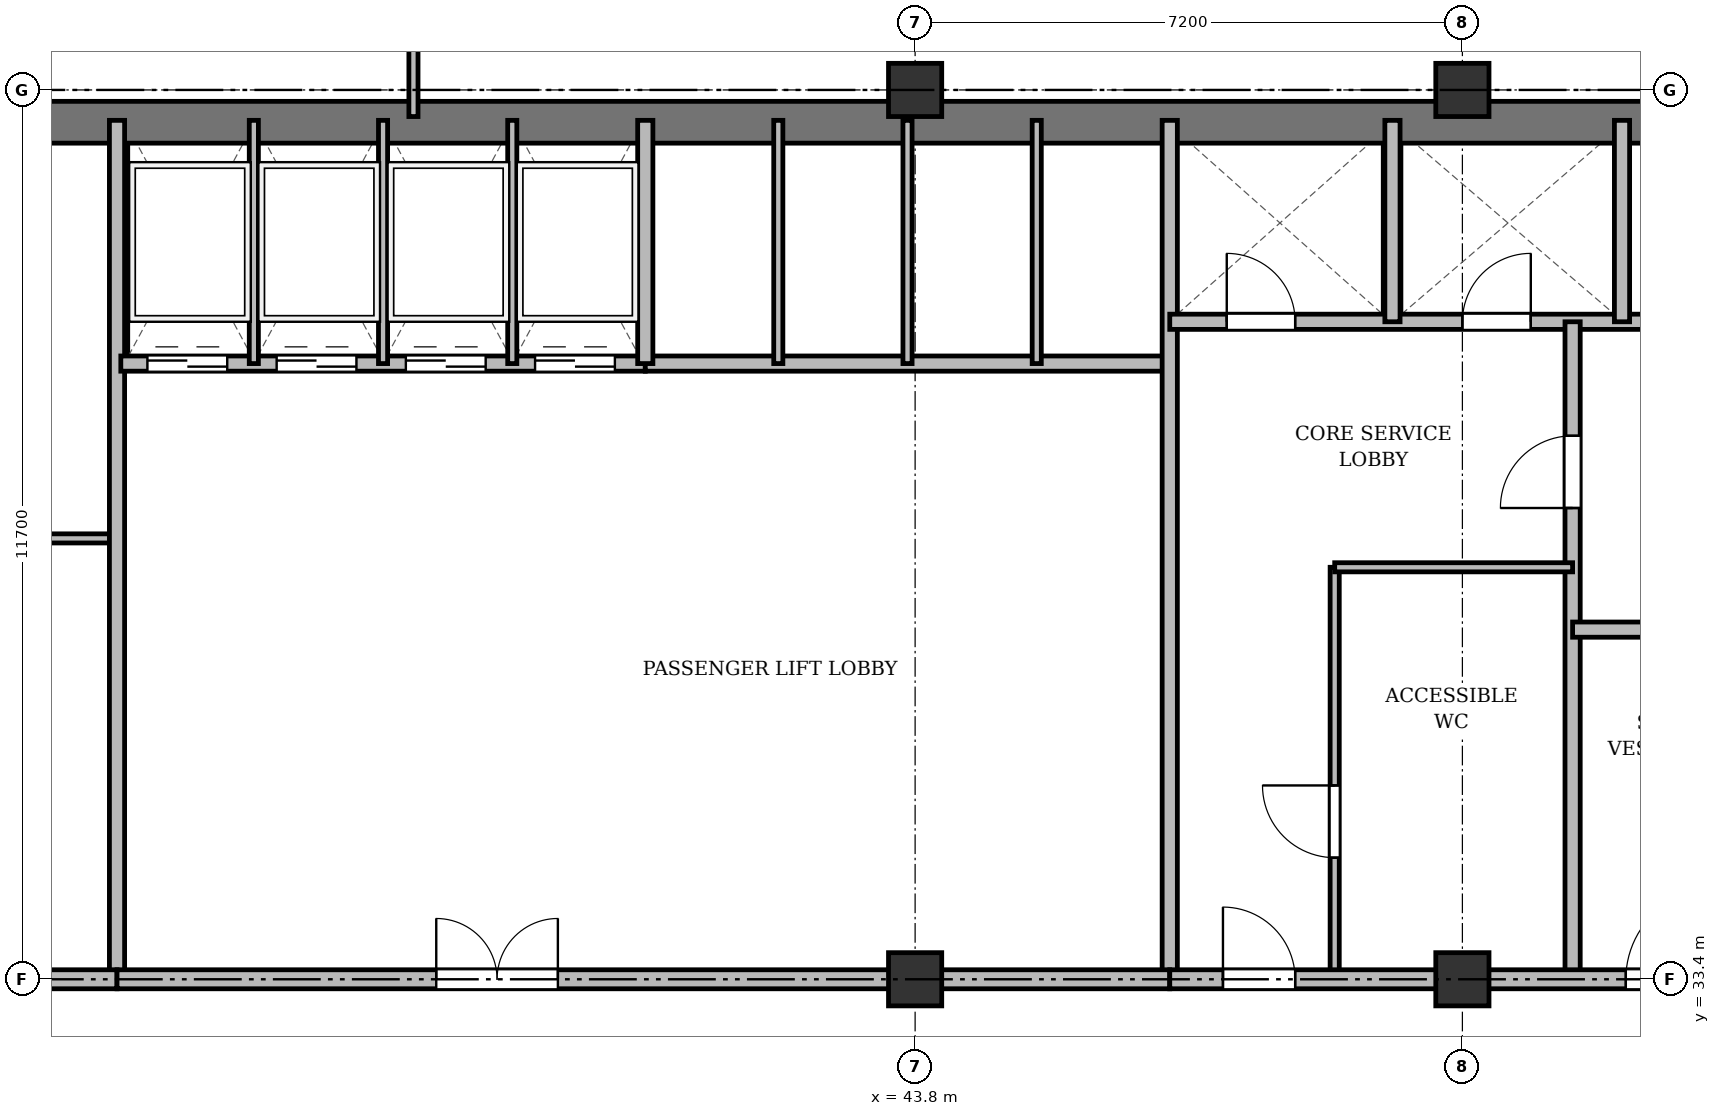
"""IFC4 building model, lengths in metres.
Left out: names, types, materials, properties, quantities, classifications, styles, units other than length and angle.
Written with IfcOpenShell. Run it as: python <this file> out.ifc"""

import sys

from ifc_helpers import new_model, si_unit, direction, frame, frame_2d, origin, origin_2d, place, context, subcontext, project, spatial, rectangle, extrude, source, transform, mapped, element, fill, save


model = new_model("IFC4")
c1 = context("Model", 3, precision=1e-05, world=origin(), true_north=direction((0.0, 1.0)))
c2 = subcontext(c1, "Body", "Model", "MODEL_VIEW")
j1 = project(units=[si_unit("LENGTHUNIT", "METRE"), si_unit("PLANEANGLEUNIT", "RADIAN")], contexts=[c1])
p1 = place(None, origin())
s1 = spatial("IfcSite", under=j1, at=p1, CompositionType="ELEMENT")
p2 = place(p1, origin())
s2 = spatial("IfcBuilding", under=s1, at=p2, CompositionType="ELEMENT")
p3 = place(p2, frame((0.0, 0.0, 175.3)))
s3 = spatial("IfcBuildingStorey", under=s2, at=p3, CompositionType="ELEMENT", Elevation=175.3)
m1 = source(origin(), c2, "Body", "SweptSolid", [
    extrude(rectangle(XDim=0.7, YDim=0.7, at=origin_2d()), origin(), (0.0, 0.0, 1.0), 3.6),
])
for number, where, z_axis, x_axis in (
    (1, (43.8, 33.4, 0.0), (0.0, 0.0, 1.0), (1.0, 0.0, 0.0)),
    (2, (43.8, 45.1, 0.0), (0.0, 0.0, 1.0), (1.0, 0.0, 0.0)),
    (3, (51.0, 33.4, 0.0), (0.0, 0.0, 1.0), (1.0, 0.0, 0.0)),
    (4, (51.0, 45.1, 0.0), (0.0, 0.0, 1.0), (1.0, 0.0, 0.0)),
):
    element("IfcColumn", number, at=place(p3, frame(where, z_axis=z_axis, x_axis=x_axis)), inside=s3, PredefinedType="COLUMN", context=c2, shape_type="MappedRepresentation", body=[
        mapped(m1, transform((0.0, 0.0, 0.0), x_axis=(1.0, 0.0, 0.0), y_axis=(0.0, 1.0, 0.0), z_axis=(0.0, 0.0, 1.0), scale=1.0)),
    ])
p4 = place(p3, frame((15.65, 44.675, 0.0), z_axis=(0.0, 0.0, 1.0), x_axis=(1.0, 0.0, 0.0)))
e5 = element("IfcWall", 5, at=p4, inside=s3, PredefinedType="SHEAR", context=c2, shape_type="SweptSolid", body=[
    extrude(rectangle(XDim=43.1, YDim=0.55, at=frame_2d((21.55, 0.0))), origin(), (0.0, 0.0, 1.0), 3.35),
])
p5 = place(p3, frame((26.3, 39.2, 0.0), z_axis=(0.0, 0.0, 1.0), x_axis=(1.0, 0.0, 0.0)))
e6 = element("IfcWall", 6, at=p5, inside=s3, PredefinedType="PARTITIONING", context=c2, shape_type="SweptSolid", body=[
    extrude(rectangle(XDim=7.0, YDim=0.12, at=frame_2d((3.5, 0.0))), origin(), (0.0, 0.0, 1.0), 2.85),
])
p6 = place(p5, frame((2.6, 0.0, 0.0)))
e7 = element("IfcOpeningElement", 7, at=p6, cuts=e6, PredefinedType="OPENING", context=c2, shape_type="SweptSolid", body=[
    extrude(rectangle(XDim=0.95, YDim=2.15, at=frame_2d((0.475, 1.075))), frame((0.0, 0.07, 0.0), z_axis=(0.0, -1.0, 0.0), x_axis=(1.0, 0.0, 0.0)), (0.0, 0.0, 1.0), 0.14),
])
p7 = place(p3, frame((33.3, 33.4, 0.0), z_axis=(0.0, 0.0, 1.0), x_axis=(0.0, 1.0, 0.0)))
e8 = element("IfcWall", 8, at=p7, inside=s3, PredefinedType="SOLIDWALL", context=c2, shape_type="SweptSolid", body=[
    extrude(rectangle(XDim=11.3, YDim=0.2, at=frame_2d((5.65, 0.0))), origin(), (0.0, 0.0, 1.0), 2.75),
])
p8 = place(p3, frame((33.35, 41.5, 0.0), z_axis=(0.0, 0.0, 1.0), x_axis=(1.0, 0.0, 0.0)))
e9 = element("IfcWall", 9, at=p8, inside=s3, PredefinedType="SOLIDWALL", context=c2, shape_type="SweptSolid", body=[
    extrude(rectangle(XDim=6.9, YDim=0.2, at=frame_2d((3.45, 0.0))), origin(), (0.0, 0.0, 1.0), 3.35),
])
p9 = place(p8, frame((0.35, 0.0, 0.0)))
e10 = element("IfcOpeningElement", 10, at=p9, cuts=e9, PredefinedType="OPENING", context=c2, shape_type="SweptSolid", body=[
    extrude(rectangle(XDim=1.05, YDim=2.15, at=frame_2d((0.525, 1.075))), frame((0.0, 0.11, 0.0), z_axis=(0.0, -1.0, 0.0), x_axis=(1.0, 0.0, 0.0)), (0.0, 0.0, 1.0), 0.22),
])
p10 = place(p8, frame((2.05, 0.0, 0.0)))
e11 = element("IfcOpeningElement", 11, at=p10, cuts=e9, PredefinedType="OPENING", context=c2, shape_type="SweptSolid", body=[
    extrude(rectangle(XDim=1.05, YDim=2.15, at=frame_2d((0.525, 1.075))), frame((0.0, 0.11, 0.0), z_axis=(0.0, -1.0, 0.0), x_axis=(1.0, 0.0, 0.0)), (0.0, 0.0, 1.0), 0.22),
])
p11 = place(p8, frame((3.75, 0.0, 0.0)))
e12 = element("IfcOpeningElement", 12, at=p11, cuts=e9, PredefinedType="OPENING", context=c2, shape_type="SweptSolid", body=[
    extrude(rectangle(XDim=1.05, YDim=2.15, at=frame_2d((0.525, 1.075))), frame((0.0, 0.11, 0.0), z_axis=(0.0, -1.0, 0.0), x_axis=(1.0, 0.0, 0.0)), (0.0, 0.0, 1.0), 0.22),
])
p12 = place(p8, frame((5.45, 0.0, 0.0)))
e13 = element("IfcOpeningElement", 13, at=p12, cuts=e9, PredefinedType="OPENING", context=c2, shape_type="SweptSolid", body=[
    extrude(rectangle(XDim=1.05, YDim=2.15, at=frame_2d((0.525, 1.075))), frame((0.0, 0.11, 0.0), z_axis=(0.0, -1.0, 0.0), x_axis=(1.0, 0.0, 0.0)), (0.0, 0.0, 1.0), 0.22),
])
for number, where, z_axis, x_axis in (
    (14, (35.1, 41.5, 0.0), (0.0, 0.0, 1.0), (0.0, 1.0, 0.0)),
    (15, (36.8, 41.5, 0.0), (0.0, 0.0, 1.0), (0.0, 1.0, 0.0)),
    (16, (38.5, 41.5, 0.0), (0.0, 0.0, 1.0), (0.0, 1.0, 0.0)),
):
    element("IfcWall", number, at=place(p3, frame(where, z_axis=z_axis, x_axis=x_axis)), inside=s3, PredefinedType="PARTITIONING", context=c2, shape_type="SweptSolid", body=[
        extrude(rectangle(XDim=3.2, YDim=0.12, at=frame_2d((1.6, 0.0))), origin(), (0.0, 0.0, 1.0), 3.35),
    ])
p13 = place(p3, frame((40.25, 41.5, 0.0), z_axis=(0.0, 0.0, 1.0), x_axis=(1.0, 0.0, 0.0)))
e17 = element("IfcWall", 17, at=p13, inside=s3, PredefinedType="SOLIDWALL", context=c2, shape_type="SweptSolid", body=[
    extrude(rectangle(XDim=6.9, YDim=0.2, at=frame_2d((3.45, 0.0))), origin(), (0.0, 0.0, 1.0), 2.85),
])
p14 = place(p3, frame((40.25, 41.5, 0.0), z_axis=(0.0, 0.0, 1.0), x_axis=(0.0, 1.0, 0.0)))
e18 = element("IfcWall", 18, at=p14, inside=s3, PredefinedType="SOLIDWALL", context=c2, shape_type="SweptSolid", body=[
    extrude(rectangle(XDim=3.2, YDim=0.2, at=frame_2d((1.6, 0.0))), origin(), (0.0, 0.0, 1.0), 3.35),
])
p15 = place(p3, frame((42.0, 41.5, 0.0), z_axis=(0.0, 0.0, 1.0), x_axis=(0.0, 1.0, 0.0)))
e19 = element("IfcWall", 19, at=p15, inside=s3, PredefinedType="PARTITIONING", context=c2, shape_type="SweptSolid", body=[
    extrude(rectangle(XDim=3.2, YDim=0.12, at=frame_2d((1.6, 0.0))), origin(), (0.0, 0.0, 1.0), 3.35),
])
p16 = place(p3, frame((43.7, 41.5, 0.0), z_axis=(0.0, 0.0, 1.0), x_axis=(0.0, 1.0, 0.0)))
e20 = element("IfcWall", 20, at=p16, inside=s3, PredefinedType="PARTITIONING", context=c2, shape_type="SweptSolid", body=[
    extrude(rectangle(XDim=3.2, YDim=0.12, at=frame_2d((1.6, 0.0))), origin(), (0.0, 0.0, 1.0), 2.85),
])
p17 = place(p3, frame((45.4, 41.5, 0.0), z_axis=(0.0, 0.0, 1.0), x_axis=(0.0, 1.0, 0.0)))
e21 = element("IfcWall", 21, at=p17, inside=s3, PredefinedType="PARTITIONING", context=c2, shape_type="SweptSolid", body=[
    extrude(rectangle(XDim=3.2, YDim=0.12, at=frame_2d((1.6, 0.0))), origin(), (0.0, 0.0, 1.0), 3.35),
])
p18 = place(p3, frame((47.15, 33.4, 0.0), z_axis=(0.0, 0.0, 1.0), x_axis=(0.0, 1.0, 0.0)))
e22 = element("IfcWall", 22, at=p18, inside=s3, PredefinedType="SOLIDWALL", context=c2, shape_type="SweptSolid", body=[
    extrude(rectangle(XDim=11.3, YDim=0.2, at=frame_2d((5.65, 0.0))), origin(), (0.0, 0.0, 1.0), 2.75),
])
p19 = place(p3, frame((26.3, 33.4, 0.0), z_axis=(0.0, 0.0, 1.0), x_axis=(1.0, 0.0, 0.0)))
e23 = element("IfcWall", 23, at=p19, inside=s3, PredefinedType="PARTITIONING", context=c2, shape_type="SweptSolid", body=[
    extrude(rectangle(XDim=7.0, YDim=0.25, at=frame_2d((3.5, 0.0))), origin(), (0.0, 0.0, 1.0), 2.75),
])
p20 = place(p19, frame((1.35, 0.0, 0.0)))
e24 = element("IfcOpeningElement", 24, at=p20, cuts=e23, PredefinedType="OPENING", context=c2, shape_type="SweptSolid", body=[
    extrude(rectangle(XDim=0.95, YDim=2.15, at=frame_2d((0.475, 1.075))), frame((0.0, 0.135, 0.0), z_axis=(0.0, -1.0, 0.0), x_axis=(1.0, 0.0, 0.0)), (0.0, 0.0, 1.0), 0.27),
])
p21 = place(p3, frame((33.3, 33.4, 0.0), z_axis=(0.0, 0.0, 1.0), x_axis=(1.0, 0.0, 0.0)))
e25 = element("IfcWall", 25, at=p21, inside=s3, PredefinedType="PARTITIONING", context=c2, shape_type="SweptSolid", body=[
    extrude(rectangle(XDim=13.85, YDim=0.25, at=frame_2d((6.925, 0.0))), origin(), (0.0, 0.0, 1.0), 2.75),
])
p22 = place(p21, frame((4.2, 0.0, 0.0)))
e26 = element("IfcOpeningElement", 26, at=p22, cuts=e25, PredefinedType="OPENING", context=c2, shape_type="SweptSolid", body=[
    extrude(rectangle(XDim=1.6, YDim=2.2, at=frame_2d((0.8, 1.1))), frame((0.0, 0.135, 0.0), z_axis=(0.0, -1.0, 0.0), x_axis=(1.0, 0.0, 0.0)), (0.0, 0.0, 1.0), 0.27),
])
p23 = place(p3, frame((47.15, 42.05, 0.0), z_axis=(0.0, 0.0, 1.0), x_axis=(1.0, 0.0, 0.0)))
e27 = element("IfcWall", 27, at=p23, inside=s3, PredefinedType="SOLIDWALL", context=c2, shape_type="SweptSolid", body=[
    extrude(rectangle(XDim=7.85, YDim=0.2, at=frame_2d((3.925, 0.0))), origin(), (0.0, 0.0, 1.0), 2.85),
])
p24 = place(p23, frame((0.75, 0.0, 0.0)))
e28 = element("IfcOpeningElement", 28, at=p24, cuts=e27, PredefinedType="OPENING", context=c2, shape_type="SweptSolid", body=[
    extrude(rectangle(XDim=0.9, YDim=2.1, at=frame_2d((0.45, 1.05))), frame((0.0, 0.11, 0.0), z_axis=(0.0, -1.0, 0.0), x_axis=(1.0, 0.0, 0.0)), (0.0, 0.0, 1.0), 0.22),
])
p25 = place(p23, frame((3.85, 0.0, 0.0)))
e29 = element("IfcOpeningElement", 29, at=p25, cuts=e27, PredefinedType="OPENING", context=c2, shape_type="SweptSolid", body=[
    extrude(rectangle(XDim=0.9, YDim=2.1, at=frame_2d((0.45, 1.05))), frame((0.0, 0.11, 0.0), z_axis=(0.0, -1.0, 0.0), x_axis=(1.0, 0.0, 0.0)), (0.0, 0.0, 1.0), 0.22),
])
for number, where, z_axis, x_axis in (
    (30, (50.08, 42.05, 0.0), (0.0, 0.0, 1.0), (0.0, 1.0, 0.0)),
    (31, (53.1, 42.05, 0.0), (0.0, 0.0, 1.0), (0.0, 1.0, 0.0)),
):
    element("IfcWall", number, at=place(p3, frame(where, z_axis=z_axis, x_axis=x_axis)), inside=s3, PredefinedType="SOLIDWALL", context=c2, shape_type="SweptSolid", body=[
        extrude(rectangle(XDim=2.65, YDim=0.2, at=frame_2d((1.325, 0.0))), origin(), (0.0, 0.0, 1.0), 3.35),
    ])
p26 = place(p3, frame((52.45, 33.4, 0.0), z_axis=(0.0, 0.0, 1.0), x_axis=(0.0, 1.0, 0.0)))
e32 = element("IfcWall", 32, at=p26, inside=s3, PredefinedType="PARTITIONING", context=c2, shape_type="SweptSolid", body=[
    extrude(rectangle(XDim=8.65, YDim=0.2, at=frame_2d((4.325, 0.0))), origin(), (0.0, 0.0, 1.0), 2.75),
])
p27 = place(p26, frame((6.2, 0.0, 0.0)))
e33 = element("IfcOpeningElement", 33, at=p27, cuts=e32, PredefinedType="OPENING", context=c2, shape_type="SweptSolid", body=[
    extrude(rectangle(XDim=0.95, YDim=2.15, at=frame_2d((0.475, 1.075))), frame((0.0, 0.11, 0.0), z_axis=(0.0, -1.0, 0.0), x_axis=(1.0, 0.0, 0.0)), (0.0, 0.0, 1.0), 0.22),
])
p28 = place(p3, frame((52.45, 38.0, 0.0), z_axis=(0.0, 0.0, 1.0), x_axis=(1.0, 0.0, 0.0)))
e34 = element("IfcWall", 34, at=p28, inside=s3, PredefinedType="PARTITIONING", context=c2, shape_type="SweptSolid", body=[
    extrude(rectangle(XDim=2.55, YDim=0.2, at=frame_2d((1.275, 0.0))), origin(), (0.0, 0.0, 1.0), 3.35),
])
p29 = place(p3, frame((49.32, 33.4, 0.0), z_axis=(0.0, 0.0, 1.0), x_axis=(0.0, 1.0, 0.0)))
e35 = element("IfcWall", 35, at=p29, inside=s3, PredefinedType="PARTITIONING", context=c2, shape_type="SweptSolid", body=[
    extrude(rectangle(XDim=5.42, YDim=0.12, at=frame_2d((2.71, 0.0))), origin(), (0.0, 0.0, 1.0), 2.75),
])
p30 = place(p29, frame((1.6, 0.0, 0.0)))
e36 = element("IfcOpeningElement", 36, at=p30, cuts=e35, PredefinedType="OPENING", context=c2, shape_type="SweptSolid", body=[
    extrude(rectangle(XDim=0.95, YDim=2.15, at=frame_2d((0.475, 1.075))), frame((0.0, 0.07, 0.0), z_axis=(0.0, -1.0, 0.0), x_axis=(1.0, 0.0, 0.0)), (0.0, 0.0, 1.0), 0.14),
])
p31 = place(p3, frame((49.32, 38.82, 0.0), z_axis=(0.0, 0.0, 1.0), x_axis=(1.0, 0.0, 0.0)))
e37 = element("IfcWall", 37, at=p31, inside=s3, PredefinedType="PARTITIONING", context=c2, shape_type="SweptSolid", body=[
    extrude(rectangle(XDim=3.13, YDim=0.12, at=frame_2d((1.565, 0.0))), origin(), (0.0, 0.0, 1.0), 2.85),
])
p32 = place(p3, frame((47.15, 33.4, 0.0), z_axis=(0.0, 0.0, 1.0), x_axis=(1.0, 0.0, 0.0)))
e38 = element("IfcWall", 38, at=p32, inside=s3, PredefinedType="PARTITIONING", context=c2, shape_type="SweptSolid", body=[
    extrude(rectangle(XDim=11.15, YDim=0.25, at=frame_2d((5.575, 0.0))), origin(), (0.0, 0.0, 1.0), 2.75),
])
p33 = place(p32, frame((0.7, 0.0, 0.0)))
e39 = element("IfcOpeningElement", 39, at=p33, cuts=e38, PredefinedType="OPENING", context=c2, shape_type="SweptSolid", body=[
    extrude(rectangle(XDim=0.95, YDim=2.15, at=frame_2d((0.475, 1.075))), frame((0.0, 0.135, 0.0), z_axis=(0.0, -1.0, 0.0), x_axis=(1.0, 0.0, 0.0)), (0.0, 0.0, 1.0), 0.27),
])
p34 = place(p32, frame((6.0, 0.0, 0.0)))
e40 = element("IfcOpeningElement", 40, at=p34, cuts=e38, PredefinedType="OPENING", context=c2, shape_type="SweptSolid", body=[
    extrude(rectangle(XDim=1.2, YDim=2.15, at=frame_2d((0.6, 1.075))), frame((0.0, 0.135, 0.0), z_axis=(0.0, -1.0, 0.0), x_axis=(1.0, 0.0, 0.0)), (0.0, 0.0, 1.0), 0.27),
])
p35 = place(p3, frame((37.2, 44.75, 0.0), z_axis=(0.0, 0.0, 1.0), x_axis=(0.0, 1.0, 0.0)))
e41 = element("IfcWall", 41, at=p35, inside=s3, PredefinedType="PARTITIONING", context=c2, shape_type="SweptSolid", body=[
    extrude(rectangle(XDim=3.61, YDim=0.12, at=frame_2d((1.805, 0.0))), origin(), (0.0, 0.0, 1.0), 2.75),
])
p36 = place(p35, frame((1.1, 0.0, 0.0)))
e42 = element("IfcOpeningElement", 42, at=p36, cuts=e41, PredefinedType="OPENING", context=c2, shape_type="SweptSolid", body=[
    extrude(rectangle(XDim=0.95, YDim=2.15, at=frame_2d((0.475, 1.075))), frame((0.0, 0.07, 0.0), z_axis=(0.0, -1.0, 0.0), x_axis=(1.0, 0.0, 0.0)), (0.0, 0.0, 1.0), 0.14),
])
m2 = source(origin(), c2, "Body", "SweptSolid", [
    extrude(rectangle(XDim=1.05, YDim=2.15, at=frame_2d((0.525, 1.075))), frame((0.0, 0.025, 0.0), z_axis=(0.0, -1.0, 0.0), x_axis=(1.0, 0.0, 0.0)), (0.0, 0.0, 1.0), 0.05),
])
p37 = place(p9, origin())
e43 = element("IfcDoor", 43, at=p37, inside=s3, OperationType="DOUBLE_DOOR_SLIDING", PredefinedType="DOOR", context=c2, shape_type="MappedRepresentation", body=[
    mapped(m2, transform((0.0, 0.0, 0.0), x_axis=(1.0, 0.0, 0.0), y_axis=(0.0, 1.0, 0.0), z_axis=(0.0, 0.0, 1.0), scale=1.0)),
])
fill(e10, e43)
p38 = place(p10, origin())
e44 = element("IfcDoor", 44, at=p38, inside=s3, OperationType="DOUBLE_DOOR_SLIDING", PredefinedType="DOOR", context=c2, shape_type="MappedRepresentation", body=[
    mapped(m2, transform((0.0, 0.0, 0.0), x_axis=(1.0, 0.0, 0.0), y_axis=(0.0, 1.0, 0.0), z_axis=(0.0, 0.0, 1.0), scale=1.0)),
])
fill(e11, e44)
p39 = place(p11, origin())
e45 = element("IfcDoor", 45, at=p39, inside=s3, OperationType="DOUBLE_DOOR_SLIDING", PredefinedType="DOOR", context=c2, shape_type="MappedRepresentation", body=[
    mapped(m2, transform((0.0, 0.0, 0.0), x_axis=(1.0, 0.0, 0.0), y_axis=(0.0, 1.0, 0.0), z_axis=(0.0, 0.0, 1.0), scale=1.0)),
])
fill(e12, e45)
p40 = place(p12, origin())
e46 = element("IfcDoor", 46, at=p40, inside=s3, OperationType="DOUBLE_DOOR_SLIDING", PredefinedType="DOOR", context=c2, shape_type="MappedRepresentation", body=[
    mapped(m2, transform((0.0, 0.0, 0.0), x_axis=(1.0, 0.0, 0.0), y_axis=(0.0, 1.0, 0.0), z_axis=(0.0, 0.0, 1.0), scale=1.0)),
])
fill(e13, e46)
m3 = source(origin(), c2, "Body", "SweptSolid", [
    extrude(rectangle(XDim=1.6, YDim=2.2, at=frame_2d((0.8, 1.1))), frame((0.0, 0.025, 0.0), z_axis=(0.0, -1.0, 0.0), x_axis=(1.0, 0.0, 0.0)), (0.0, 0.0, 1.0), 0.05),
])
p41 = place(p22, origin())
e47 = element("IfcDoor", 47, at=p41, inside=s3, OperationType="DOUBLE_DOOR_SINGLE_SWING", PredefinedType="DOOR", context=c2, shape_type="MappedRepresentation", body=[
    mapped(m3, transform((0.0, 0.0, 0.0), x_axis=(1.0, 0.0, 0.0), y_axis=(0.0, 1.0, 0.0), z_axis=(0.0, 0.0, 1.0), scale=1.0)),
])
fill(e26, e47)
m4 = source(origin(), c2, "Body", "SweptSolid", [
    extrude(rectangle(XDim=0.9, YDim=2.1, at=frame_2d((0.45, 1.05))), frame((0.0, 0.025, 0.0), z_axis=(0.0, -1.0, 0.0), x_axis=(1.0, 0.0, 0.0)), (0.0, 0.0, 1.0), 0.05),
])
p42 = place(p24, origin())
e48 = element("IfcDoor", 48, at=p42, inside=s3, OperationType="SINGLE_SWING_LEFT", PredefinedType="DOOR", context=c2, shape_type="MappedRepresentation", body=[
    mapped(m4, transform((0.0, 0.0, 0.0), x_axis=(1.0, 0.0, 0.0), y_axis=(0.0, 1.0, 0.0), z_axis=(0.0, 0.0, 1.0), scale=1.0)),
])
fill(e28, e48)
p43 = place(p25, origin())
e49 = element("IfcDoor", 49, at=p43, inside=s3, OperationType="SINGLE_SWING_RIGHT", PredefinedType="DOOR", context=c2, shape_type="MappedRepresentation", body=[
    mapped(m4, transform((0.0, 0.0, 0.0), x_axis=(1.0, 0.0, 0.0), y_axis=(0.0, 1.0, 0.0), z_axis=(0.0, 0.0, 1.0), scale=1.0)),
])
fill(e29, e49)
m5 = source(origin(), c2, "Body", "SweptSolid", [
    extrude(rectangle(XDim=0.95, YDim=2.15, at=frame_2d((0.475, 1.075))), frame((0.0, 0.025, 0.0), z_axis=(0.0, -1.0, 0.0), x_axis=(1.0, 0.0, 0.0)), (0.0, 0.0, 1.0), 0.05),
])
p44 = place(p27, origin())
e50 = element("IfcDoor", 50, at=p44, inside=s3, OperationType="SINGLE_SWING_LEFT", PredefinedType="DOOR", context=c2, shape_type="MappedRepresentation", body=[
    mapped(m5, transform((0.0, 0.0, 0.0), x_axis=(1.0, 0.0, 0.0), y_axis=(0.0, 1.0, 0.0), z_axis=(0.0, 0.0, 1.0), scale=1.0)),
])
fill(e33, e50)
p45 = place(p30, origin())
e51 = element("IfcDoor", 51, at=p45, inside=s3, OperationType="SINGLE_SWING_RIGHT", PredefinedType="DOOR", context=c2, shape_type="MappedRepresentation", body=[
    mapped(m5, transform((0.0, 0.0, 0.0), x_axis=(1.0, 0.0, 0.0), y_axis=(0.0, 1.0, 0.0), z_axis=(0.0, 0.0, 1.0), scale=1.0)),
])
fill(e36, e51)
p46 = place(p33, origin())
e52 = element("IfcDoor", 52, at=p46, inside=s3, OperationType="SINGLE_SWING_LEFT", PredefinedType="DOOR", context=c2, shape_type="MappedRepresentation", body=[
    mapped(m5, transform((0.0, 0.0, 0.0), x_axis=(1.0, 0.0, 0.0), y_axis=(0.0, 1.0, 0.0), z_axis=(0.0, 0.0, 1.0), scale=1.0)),
])
fill(e39, e52)
m6 = source(origin(), c2, "Body", "SweptSolid", [
    extrude(rectangle(XDim=1.2, YDim=2.15, at=frame_2d((0.6, 1.075))), frame((0.0, 0.025, 0.0), z_axis=(0.0, -1.0, 0.0), x_axis=(1.0, 0.0, 0.0)), (0.0, 0.0, 1.0), 0.05),
])
p47 = place(p34, origin())
e53 = element("IfcDoor", 53, at=p47, inside=s3, OperationType="SINGLE_SWING_RIGHT", PredefinedType="DOOR", context=c2, shape_type="MappedRepresentation", body=[
    mapped(m6, transform((0.0, 0.0, 0.0), x_axis=(1.0, 0.0, 0.0), y_axis=(0.0, 1.0, 0.0), z_axis=(0.0, 0.0, 1.0), scale=1.0)),
])
fill(e40, e53)
save(model, sys.argv[1])
